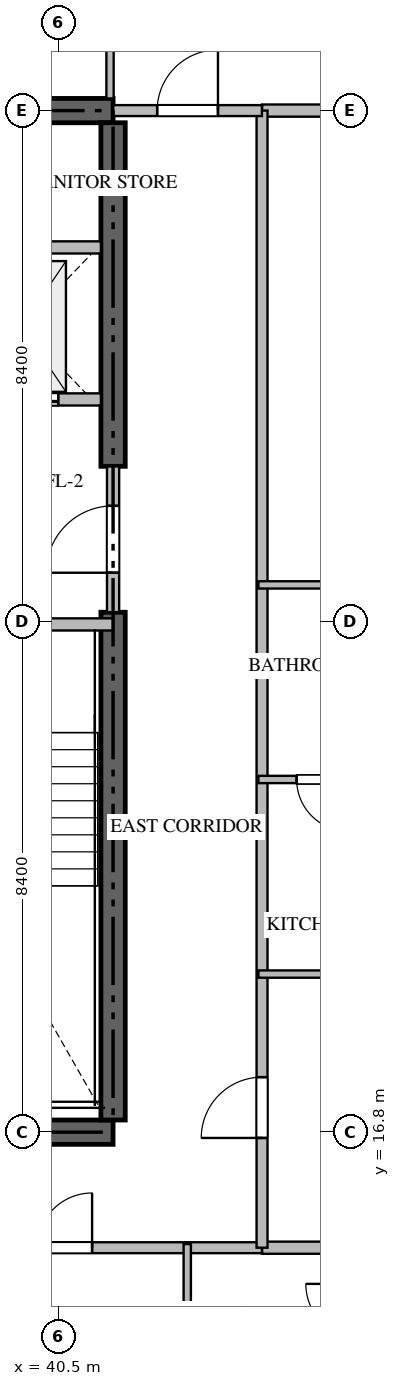
"""IFC4 building model, lengths in metres.
Left out: names, types, materials, properties, quantities, classifications, styles, units other than length and angle.
Written with IfcOpenShell. Run it as: python <this file> out.ifc"""

import sys

from ifc_helpers import new_model, si_unit, direction, frame, frame_2d, origin, place, context, subcontext, project, spatial, rectangle, extrude, source, transform, mapped, element, fill, save


model = new_model("IFC4")
c1 = context("Model", 3, precision=1e-05, world=origin(), true_north=direction((0.0, 1.0)))
c2 = subcontext(c1, "Body", "Model", "MODEL_VIEW")
j1 = project(units=[si_unit("LENGTHUNIT", "METRE"), si_unit("PLANEANGLEUNIT", "RADIAN")], contexts=[c1])
p1 = place(None, origin())
s1 = spatial("IfcSite", under=j1, at=p1, CompositionType="ELEMENT")
p2 = place(p1, origin())
s2 = spatial("IfcBuilding", under=s1, at=p2, CompositionType="ELEMENT")
p3 = place(p2, frame((0.0, 0.0, 195.15)))
s3 = spatial("IfcBuildingStorey", under=s2, at=p3, CompositionType="ELEMENT", Elevation=195.15)
for number, where, z_axis, x_axis in (
    (1, (23.4, 16.8, -0.26), (0.0, 0.0, 1.0), (1.0, 0.0, 0.0)),
    (2, (41.4, 33.6, -0.26), (0.0, 0.0, 1.0), (-1.0, 0.0, 0.0)),
):
    element("IfcWall", number, at=place(p3, frame(where, z_axis=z_axis, x_axis=x_axis)), inside=s3, PredefinedType="SHEAR", context=c2, shape_type="SweptSolid", body=[
        extrude(rectangle(XDim=18.0, YDim=0.4, at=frame_2d((9.0, 0.0))), origin(), (0.0, 0.0, 1.0), 3.568),
    ])
p4 = place(p3, frame((41.4, 17.0, -0.26), z_axis=(0.0, 0.0, 1.0), x_axis=(0.0, 1.0, 0.0)))
e3 = element("IfcWall", 3, at=p4, inside=s3, PredefinedType="SHEAR", context=c2, shape_type="SweptSolid", body=[
    extrude(rectangle(XDim=8.35, YDim=0.4, at=frame_2d((4.175, 0.0))), origin(), (0.0, 0.0, 1.0), 3.568),
])
p5 = place(p3, frame((41.4, 27.75, -0.26), z_axis=(0.0, 0.0, 1.0), x_axis=(0.0, 1.0, 0.0)))
e4 = element("IfcWall", 4, at=p5, inside=s3, PredefinedType="SHEAR", context=c2, shape_type="SweptSolid", body=[
    extrude(rectangle(XDim=5.65, YDim=0.4, at=frame_2d((2.825, 0.0))), origin(), (0.0, 0.0, 1.0), 3.568),
])
p6 = place(p3, frame((36.95, 25.15, 0.0), z_axis=(0.0, 0.0, 1.0), x_axis=(1.0, 0.0, 0.0)))
e5 = element("IfcWall", 5, at=p6, inside=s3, PredefinedType="STANDARD", context=c2, shape_type="SweptSolid", body=[
    extrude(rectangle(XDim=4.45, YDim=0.2, at=frame_2d((2.225, 0.0))), origin(), (0.0, 0.0, 1.0), 3.31),
])
p7 = place(p6, frame((1.65, 0.0, 0.0)))
e6 = element("IfcOpeningElement", 6, at=p7, cuts=e5, PredefinedType="OPENING", context=c2, shape_type="SweptSolid", body=[
    extrude(rectangle(XDim=1.1, YDim=2.15, at=frame_2d((0.55, 1.075))), frame((0.0, 0.11, 0.0), z_axis=(0.0, -1.0, 0.0), x_axis=(1.0, 0.0, 0.0)), (0.0, 0.0, 1.0), 0.22),
])
p8 = place(p3, frame((38.75, 28.85, 0.0), z_axis=(0.0, 0.0, 1.0), x_axis=(1.0, 0.0, 0.0)))
e7 = element("IfcWall", 7, at=p8, inside=s3, PredefinedType="STANDARD", context=c2, shape_type="SweptSolid", body=[
    extrude(rectangle(XDim=2.45, YDim=0.2, at=frame_2d((1.225, 0.0))), origin(), (0.0, 0.0, 1.0), 3.31),
])
p9 = place(p8, frame((0.55, 0.0, 0.0)))
e8 = element("IfcOpeningElement", 8, at=p9, cuts=e7, PredefinedType="OPENING", context=c2, shape_type="SweptSolid", body=[
    extrude(rectangle(XDim=1.2, YDim=2.2, at=frame_2d((0.6, 1.1))), frame((0.0, 0.11, 0.0), z_axis=(0.0, -1.0, 0.0), x_axis=(1.0, 0.0, 0.0)), (0.0, 0.0, 1.0), 0.22),
])
p10 = place(p3, frame((38.75, 31.35, 0.0), z_axis=(0.0, 0.0, 1.0), x_axis=(1.0, 0.0, 0.0)))
e9 = element("IfcWall", 9, at=p10, inside=s3, PredefinedType="STANDARD", context=c2, shape_type="SweptSolid", body=[
    extrude(rectangle(XDim=2.45, YDim=0.2, at=frame_2d((1.225, 0.0))), origin(), (0.0, 0.0, 1.0), 3.31),
])
p11 = place(p3, frame((41.4, 25.352, 0.0), z_axis=(0.0, 0.0, 1.0), x_axis=(0.0, 1.0, 0.0)))
e10 = element("IfcWall", 10, at=p11, inside=s3, PredefinedType="STANDARD", context=c2, shape_type="SweptSolid", body=[
    extrude(rectangle(XDim=2.396, YDim=0.2, at=frame_2d((1.198, 0.0))), origin(), (0.0, 0.0, 1.0), 3.31),
])
p12 = place(p11, frame((0.648, 0.0, 0.0)))
e11 = element("IfcOpeningElement", 11, at=p12, cuts=e10, PredefinedType="OPENING", context=c2, shape_type="SweptSolid", body=[
    extrude(rectangle(XDim=1.1, YDim=2.15, at=frame_2d((0.55, 1.075))), frame((0.0, 0.11, 0.0), z_axis=(0.0, -1.0, 0.0), x_axis=(1.0, 0.0, 0.0)), (0.0, 0.0, 1.0), 0.22),
])
for number, where, z_axis, x_axis in (
    (12, (43.85, 14.9, 0.0), (0.0, 0.0, 1.0), (1.0, 0.0, 0.0)),
    (13, (43.85, 33.6, 0.0), (0.0, 0.0, 1.0), (1.0, 0.0, 0.0)),
):
    element("IfcWall", number, at=place(p3, frame(where, z_axis=z_axis, x_axis=x_axis)), inside=s3, PredefinedType="PARTITIONING", context=c2, shape_type="SweptSolid", body=[
        extrude(rectangle(XDim=13.068, YDim=0.2, at=frame_2d((6.534, 0.0))), origin(), (0.0, 0.0, 1.0), 3.31),
    ])
p13 = place(p3, frame((20.952, 14.9, 0.0), z_axis=(0.0, 0.0, 1.0), x_axis=(1.0, 0.0, 0.0)))
e14 = element("IfcWall", 14, at=p13, inside=s3, PredefinedType="PARTITIONING", context=c2, shape_type="SweptSolid", body=[
    extrude(rectangle(XDim=22.896, YDim=0.18, at=frame_2d((11.448, 0.0))), origin(), (0.0, 0.0, 1.0), 2.145),
])
p14 = place(p13, frame((14.231, 0.0, 0.0)))
e15 = element("IfcOpeningElement", 15, at=p14, cuts=e14, PredefinedType="OPENING", context=c2, shape_type="SweptSolid", body=[
    extrude(rectangle(XDim=0.9, YDim=2.1, at=frame_2d((0.45, 1.05))), frame((0.0, 0.1, 0.0), z_axis=(0.0, -1.0, 0.0), x_axis=(1.0, 0.0, 0.0)), (0.0, 0.0, 1.0), 0.2),
])
p15 = place(p13, frame((19.203, 0.0, 0.0)))
e16 = element("IfcOpeningElement", 16, at=p15, cuts=e14, PredefinedType="OPENING", context=c2, shape_type="SweptSolid", body=[
    extrude(rectangle(XDim=0.9, YDim=2.1, at=frame_2d((0.45, 1.05))), frame((0.0, 0.1, 0.0), z_axis=(0.0, -1.0, 0.0), x_axis=(1.0, 0.0, 0.0)), (0.0, 0.0, 1.0), 0.2),
])
p16 = place(p3, frame((43.85, 14.9, 0.0), z_axis=(0.0, 0.0, 1.0), x_axis=(0.0, 1.0, 0.0)))
e17 = element("IfcWall", 17, at=p16, inside=s3, PredefinedType="PARTITIONING", context=c2, shape_type="SweptSolid", body=[
    extrude(rectangle(XDim=18.7, YDim=0.18, at=frame_2d((9.35, 0.0))), origin(), (0.0, 0.0, 1.0), 3.31),
])
p17 = place(p16, frame((1.805, 0.0, 0.0)))
e18 = element("IfcOpeningElement", 18, at=p17, cuts=e17, PredefinedType="OPENING", context=c2, shape_type="SweptSolid", body=[
    extrude(rectangle(XDim=1.0, YDim=2.15, at=frame_2d((0.5, 1.075))), frame((0.0, 0.1, 0.0), z_axis=(0.0, -1.0, 0.0), x_axis=(1.0, 0.0, 0.0)), (0.0, 0.0, 1.0), 0.2),
])
p18 = place(p3, frame((41.402, 33.6, 0.0), z_axis=(0.0, 0.0, 1.0), x_axis=(1.0, 0.0, 0.0)))
e19 = element("IfcWall", 19, at=p18, inside=s3, PredefinedType="PARTITIONING", context=c2, shape_type="SweptSolid", body=[
    extrude(rectangle(XDim=2.446, YDim=0.18, at=frame_2d((1.223, 0.0))), origin(), (0.0, 0.0, 1.0), 3.31),
])
p19 = place(p18, frame((0.723, 0.0, 0.0)))
e20 = element("IfcOpeningElement", 20, at=p19, cuts=e19, PredefinedType="OPENING", context=c2, shape_type="SweptSolid", body=[
    extrude(rectangle(XDim=1.0, YDim=2.15, at=frame_2d((0.5, 1.075))), frame((0.0, 0.1, 0.0), z_axis=(0.0, -1.0, 0.0), x_axis=(1.0, 0.0, 0.0)), (0.0, 0.0, 1.0), 0.2),
])
p20 = place(p3, frame((42.62, 12.15, 0.0), z_axis=(0.0, 0.0, 1.0), x_axis=(0.0, 1.0, 0.0)))
e21 = element("IfcWall", 21, at=p20, inside=s3, PredefinedType="PARTITIONING", context=c2, shape_type="SweptSolid", body=[
    extrude(rectangle(XDim=2.81, YDim=0.12, at=frame_2d((1.405, 0.0))), origin(), (0.0, 0.0, 1.0), 3.31),
])
p21 = place(p3, frame((41.35, 36.35, 0.0), z_axis=(0.0, 0.0, 1.0), x_axis=(0.0, -1.0, 0.0)))
e22 = element("IfcWall", 22, at=p21, inside=s3, PredefinedType="PARTITIONING", context=c2, shape_type="SweptSolid", body=[
    extrude(rectangle(XDim=2.55, YDim=0.12, at=frame_2d((1.275, 0.0))), origin(), (0.0, 0.0, 1.0), 3.31),
])
p22 = place(p3, frame((46.6, 19.4, 0.0), z_axis=(0.0, 0.0, 1.0), x_axis=(-1.0, 0.0, 0.0)))
e23 = element("IfcWall", 23, at=p22, inside=s3, PredefinedType="PARTITIONING", context=c2, shape_type="SweptSolid", body=[
    extrude(rectangle(XDim=2.81, YDim=0.12, at=frame_2d((1.405, 0.0))), origin(), (0.0, 0.0, 1.0), 3.31),
])
p23 = place(p3, frame((45.9, 25.8, 0.0), z_axis=(0.0, 0.0, 1.0), x_axis=(-1.0, 0.0, 0.0)))
e24 = element("IfcWall", 24, at=p23, inside=s3, PredefinedType="PARTITIONING", context=c2, shape_type="SweptSolid", body=[
    extrude(rectangle(XDim=2.11, YDim=0.12, at=frame_2d((1.055, 0.0))), origin(), (0.0, 0.0, 1.0), 3.31),
])
p24 = place(p3, frame((45.898, 22.6, 0.0), z_axis=(0.0, 0.0, 1.0), x_axis=(-1.0, 0.0, 0.0)))
e25 = element("IfcWall", 25, at=p24, inside=s3, PredefinedType="PARTITIONING", context=c2, shape_type="SweptSolid", body=[
    extrude(rectangle(XDim=2.108, YDim=0.12, at=frame_2d((1.054, 0.0))), origin(), (0.0, 0.0, 1.0), 3.31),
])
p25 = place(p24, frame((0.629, 0.0, 0.0)))
e26 = element("IfcOpeningElement", 26, at=p25, cuts=e25, PredefinedType="OPENING", context=c2, shape_type="SweptSolid", body=[
    extrude(rectangle(XDim=0.85, YDim=2.1, at=frame_2d((0.425, 1.05))), frame((0.0, 0.07, 0.0), z_axis=(0.0, -1.0, 0.0), x_axis=(1.0, 0.0, 0.0)), (0.0, 0.0, 1.0), 0.14),
])
m1 = source(origin(), c2, "Body", "SweptSolid", [
    extrude(rectangle(XDim=1.2, YDim=2.2, at=frame_2d((0.6, 1.1))), frame((0.0, 0.025, 0.0), z_axis=(0.0, -1.0, 0.0), x_axis=(1.0, 0.0, 0.0)), (0.0, 0.0, 1.0), 0.05),
])
p26 = place(p9, origin())
e27 = element("IfcDoor", 27, at=p26, inside=s3, OperationType="DOUBLE_DOOR_SLIDING", PredefinedType="DOOR", context=c2, shape_type="MappedRepresentation", body=[
    mapped(m1, transform((0.0, 0.0, 0.0), scale=1.0)),
])
fill(e8, e27)
m2 = source(origin(), c2, "Body", "SweptSolid", [
    extrude(rectangle(XDim=1.1, YDim=2.15, at=frame_2d((0.55, 1.075))), frame((0.0, 0.025, 0.0), z_axis=(0.0, -1.0, 0.0), x_axis=(1.0, 0.0, 0.0)), (0.0, 0.0, 1.0), 0.05),
])
p27 = place(p12, origin())
e28 = element("IfcDoor", 28, at=p27, inside=s3, OperationType="SINGLE_SWING_LEFT", PredefinedType="DOOR", context=c2, shape_type="MappedRepresentation", body=[
    mapped(m2, transform((0.0, 0.0, 0.0), scale=1.0)),
])
fill(e11, e28)
m3 = source(origin(), c2, "Body", "SweptSolid", [
    extrude(rectangle(XDim=0.9, YDim=2.1, at=frame_2d((0.45, 1.05))), frame((0.0, 0.025, 0.0), z_axis=(0.0, -1.0, 0.0), x_axis=(1.0, 0.0, 0.0)), (0.0, 0.0, 1.0), 0.05),
])
p28 = place(p15, origin())
e29 = element("IfcDoor", 29, at=p28, inside=s3, OperationType="SINGLE_SWING_RIGHT", PredefinedType="DOOR", context=c2, shape_type="MappedRepresentation", body=[
    mapped(m3, transform((0.0, 0.0, 0.0), scale=1.0)),
])
fill(e16, e29)
m4 = source(origin(), c2, "Body", "SweptSolid", [
    extrude(rectangle(XDim=1.0, YDim=2.15, at=frame_2d((0.5, 1.075))), frame((0.0, 0.025, 0.0), z_axis=(0.0, -1.0, 0.0), x_axis=(1.0, 0.0, 0.0)), (0.0, 0.0, 1.0), 0.05),
])
p29 = place(p17, origin())
e30 = element("IfcDoor", 30, at=p29, inside=s3, OperationType="SINGLE_SWING_LEFT", PredefinedType="DOOR", context=c2, shape_type="MappedRepresentation", body=[
    mapped(m4, transform((0.0, 0.0, 0.0), scale=1.0)),
])
fill(e18, e30)
p30 = place(p19, origin())
e31 = element("IfcDoor", 31, at=p30, inside=s3, OperationType="SINGLE_SWING_RIGHT", PredefinedType="DOOR", context=c2, shape_type="MappedRepresentation", body=[
    mapped(m4, transform((0.0, 0.0, 0.0), scale=1.0)),
])
fill(e20, e31)
m5 = source(origin(), c2, "Body", "SweptSolid", [
    extrude(rectangle(XDim=0.85, YDim=2.1, at=frame_2d((0.425, 1.05))), frame((0.0, 0.025, 0.0), z_axis=(0.0, -1.0, 0.0), x_axis=(1.0, 0.0, 0.0)), (0.0, 0.0, 1.0), 0.05),
])
p31 = place(p25, origin())
e32 = element("IfcDoor", 32, at=p31, inside=s3, OperationType="SINGLE_SWING_LEFT", PredefinedType="DOOR", context=c2, shape_type="MappedRepresentation", body=[
    mapped(m5, transform((0.0, 0.0, 0.0), scale=1.0)),
])
fill(e26, e32)
save(model, sys.argv[1])
